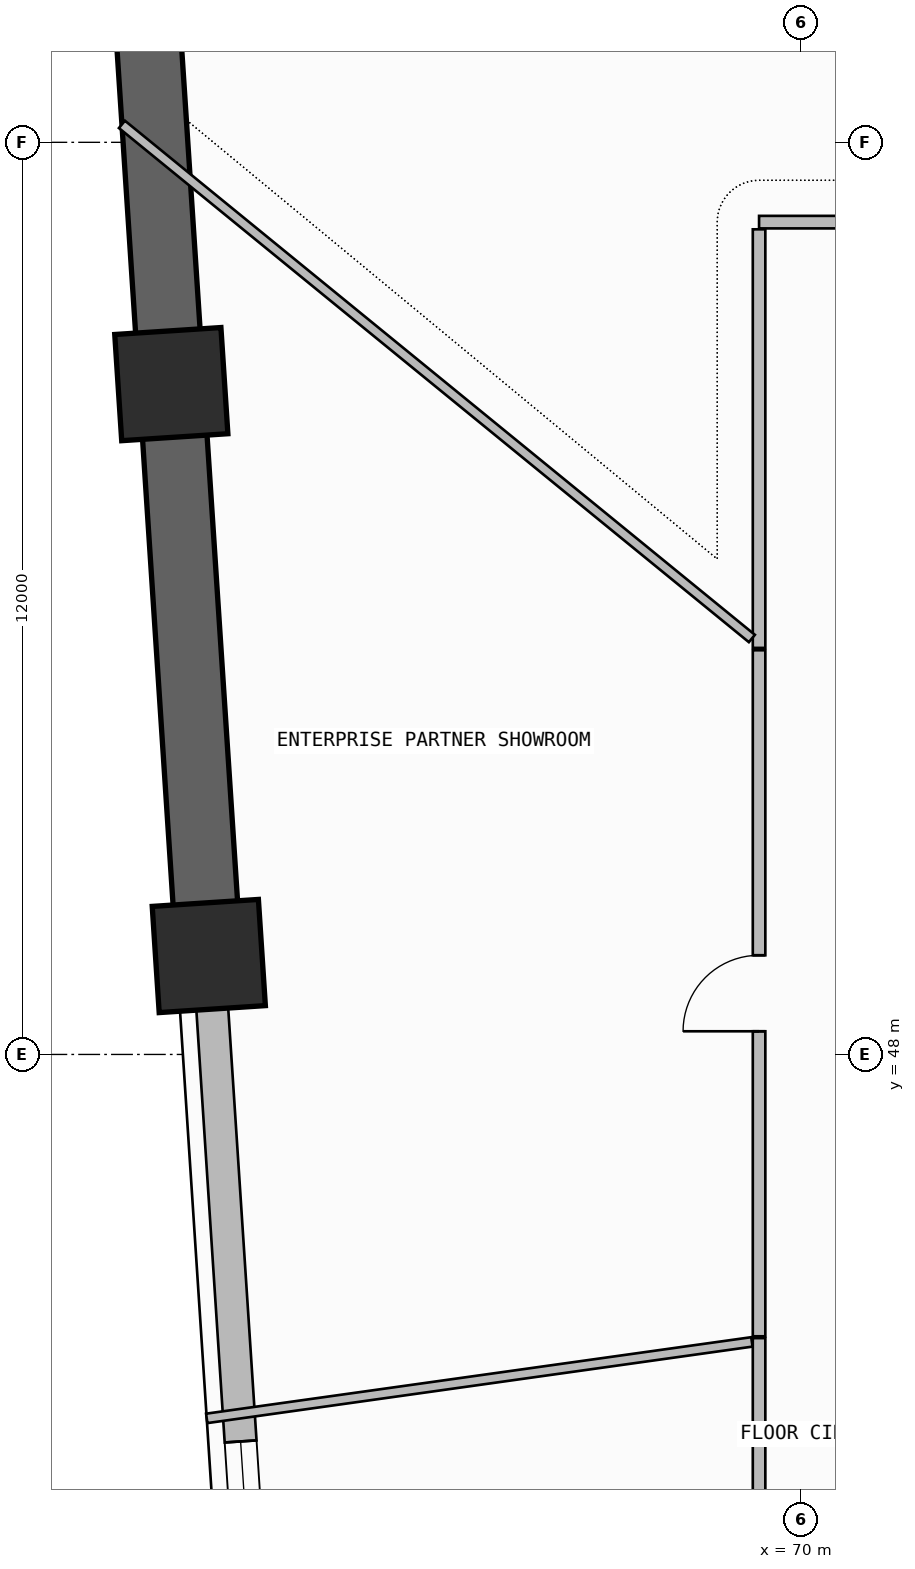
"""IFC4 building model, lengths in metres.
Left out: names, types, materials, properties, quantities, classifications, styles, units other than length and angle.
Written with IfcOpenShell. Run it as: python <this file> out.ifc"""

import sys

from ifc_helpers import new_model, si_unit, direction, frame, frame_2d, origin, origin_2d, place, context, subcontext, project, spatial, rectangle, extrude, element, fill, save


model = new_model("IFC4")
c1 = context("Model", 3, precision=1e-05, world=origin(), true_north=direction((0.0, 1.0)))
c2 = subcontext(c1, "Body", "Model", "MODEL_VIEW")
j1 = project(units=[si_unit("LENGTHUNIT", "METRE"), si_unit("PLANEANGLEUNIT", "RADIAN")], contexts=[c1])
p1 = place(None, origin())
s1 = spatial("IfcSite", under=j1, at=p1, CompositionType="ELEMENT")
p2 = place(p1, origin())
s2 = spatial("IfcBuilding", under=s1, at=p2, CompositionType="ELEMENT")
p3 = place(p2, frame((0.0, 0.0, 74.1)))
s3 = spatial("IfcBuildingStorey", under=s2, at=p3, CompositionType="ELEMENT", Elevation=74.1)
for number, where, z_axis, x_axis in (
    (1, (61.717, 56.819, 0.0), (0.0, 0.0, 1.0), (-0.065, 0.998, 0.0)),
    (2, (62.21, 49.295, 0.0), (0.0, 0.0, 1.0), (-0.065, 0.998, 0.0)),
):
    element("IfcColumn", number, at=place(p3, frame(where, z_axis=z_axis, x_axis=x_axis)), inside=s3, PredefinedType="COLUMN", context=c2, shape_type="SweptSolid", body=[
        extrude(rectangle(XDim=1.4, YDim=1.4, at=origin_2d()), origin(), (0.0, 0.0, 1.0), 3.6),
    ])
p4 = place(p3, frame((60.785, 71.031, -0.26), z_axis=(0.0, 0.0, 1.0), x_axis=(0.065409824833, -0.997858484363, 0.0)))
e3 = element("IfcWall", 3, at=p4, inside=s3, PredefinedType="SHEAR", context=c2, shape_type="SweptSolid", body=[
    extrude(rectangle(XDim=21.783, YDim=0.85, at=frame_2d((10.891, 0.0))), origin(), (0.0, 0.0, 1.0), 3.6),
])
p5 = place(p4, frame((2.2, 0.0, 1.2)))
e4 = element("IfcOpeningElement", 4, at=p5, cuts=e3, PredefinedType="OPENING", context=c2, shape_type="SweptSolid", body=[
    extrude(rectangle(XDim=1.8, YDim=0.9, at=frame_2d((0.9, 0.45))), frame((0.0, 0.435, 0.0), z_axis=(0.0, -1.0, 0.0), x_axis=(1.0, 0.0, 0.0)), (0.0, 0.0, 1.0), 0.87),
])
p6 = place(p3, frame((62.21, 49.295, 0.0), z_axis=(0.0, 0.0, 1.0), x_axis=(0.065396027757, -0.997859388668, 0.0)))
e5 = element("IfcWall", 5, at=p6, inside=s3, PredefinedType="SOLIDWALL", context=c2, shape_type="SweptSolid", body=[
    extrude(rectangle(XDim=14.242, YDim=0.42, at=frame_2d((7.121, 0.0))), origin(), (0.0, 0.0, 1.0), 2.325),
])
p7 = place(p6, frame((6.4, 0.0, 1.2)))
e6 = element("IfcOpeningElement", 6, at=p7, cuts=e5, PredefinedType="OPENING", context=c2, shape_type="SweptSolid", body=[
    extrude(rectangle(XDim=1.8, YDim=0.9, at=frame_2d((0.9, 0.45))), frame((0.0, 0.22, 0.0), z_axis=(0.0, -1.0, 0.0), x_axis=(1.0, 0.0, 0.0)), (0.0, 0.0, 1.0), 0.44),
])
p8 = place(p3, frame((69.45, 44.268, 0.0), z_axis=(0.0, 0.0, 1.0), x_axis=(0.0, -1.0, 0.0)))
e7 = element("IfcWall", 7, at=p8, inside=s3, PredefinedType="PARTITIONING", context=c2, shape_type="SweptSolid", body=[
    extrude(rectangle(XDim=11.306, YDim=0.165, at=frame_2d((5.653, 0.0))), origin(), (0.0, 0.0, 1.0), 3.34),
])
p9 = place(p8, frame((5.153, 0.0, 0.0)))
e8 = element("IfcOpeningElement", 8, at=p9, cuts=e7, PredefinedType="OPENING", context=c2, shape_type="SweptSolid", body=[
    extrude(rectangle(XDim=1.0, YDim=2.2, at=frame_2d((0.5, 1.1))), frame((0.0, 0.093, 0.0), z_axis=(0.0, -1.0, 0.0), x_axis=(1.0, 0.0, 0.0)), (0.0, 0.0, 1.0), 0.185),
])
p10 = place(p3, frame((62.183, 43.212, 0.0), z_axis=(0.0, 0.0, 1.0), x_axis=(0.990300324939, 0.138943392879, 0.0)))
e9 = element("IfcWall", 9, at=p10, inside=s3, PredefinedType="PARTITIONING", context=c2, shape_type="SweptSolid", body=[
    extrude(rectangle(XDim=7.243, YDim=0.125, at=frame_2d((3.622, 0.0))), origin(), (0.0, 0.0, 1.0), 3.34),
])
p11 = place(p3, frame((78.14, 58.95, 0.0), z_axis=(0.0, 0.0, 1.0), x_axis=(-1.0, 0.0, 0.0)))
e10 = element("IfcWall", 10, at=p11, inside=s3, PredefinedType="PARTITIONING", context=c2, shape_type="SweptSolid", body=[
    extrude(rectangle(XDim=8.69, YDim=0.165, at=frame_2d((4.345, 0.0))), origin(), (0.0, 0.0, 1.0), 2.725),
])
p12 = place(p11, frame((2.751, 0.0, 0.0)))
e11 = element("IfcOpeningElement", 11, at=p12, cuts=e10, PredefinedType="OPENING", context=c2, shape_type="SweptSolid", body=[
    extrude(rectangle(XDim=1.0, YDim=2.2, at=frame_2d((0.5, 1.1))), frame((0.0, 0.093, 0.0), z_axis=(0.0, -1.0, 0.0), x_axis=(1.0, 0.0, 0.0)), (0.0, 0.0, 1.0), 0.185),
])
p13 = place(p3, frame((69.45, 58.855, 0.0), z_axis=(0.0, 0.0, 1.0), x_axis=(0.0, -1.0, 0.0)))
e12 = element("IfcWall", 12, at=p13, inside=s3, PredefinedType="PARTITIONING", context=c2, shape_type="SweptSolid", body=[
    extrude(rectangle(XDim=5.507, YDim=0.165, at=frame_2d((2.753, 0.0))), origin(), (0.0, 0.0, 1.0), 2.725),
])
p14 = place(p3, frame((69.355, 53.472, 0.0), z_axis=(0.0, 0.0, 1.0), x_axis=(-0.774767054574, 0.632246796074, 0.0)))
e13 = element("IfcWall", 13, at=p14, inside=s3, PredefinedType="PARTITIONING", context=c2, shape_type="SweptSolid", body=[
    extrude(rectangle(XDim=10.698, YDim=0.125, at=frame_2d((5.349, 0.0))), origin(), (0.0, 0.0, 1.0), 2.325),
])
p15 = place(p3, frame((69.45, 53.317, 0.0), z_axis=(0.0, 0.0, 1.0), x_axis=(0.0, -1.0, 0.0)))
e14 = element("IfcWall", 14, at=p15, inside=s3, PredefinedType="PARTITIONING", context=c2, shape_type="SweptSolid", body=[
    extrude(rectangle(XDim=9.025, YDim=0.165, at=frame_2d((4.513, 0.0))), origin(), (0.0, 0.0, 1.0), 2.725),
])
p16 = place(p15, frame((4.013, 0.0, 0.0)))
e15 = element("IfcOpeningElement", 15, at=p16, cuts=e14, PredefinedType="OPENING", context=c2, shape_type="SweptSolid", body=[
    extrude(rectangle(XDim=1.0, YDim=2.2, at=frame_2d((0.5, 1.1))), frame((0.0, 0.093, 0.0), z_axis=(0.0, -1.0, 0.0), x_axis=(1.0, 0.0, 0.0)), (0.0, 0.0, 1.0), 0.185),
])
p17 = place(p7, origin())
e16 = element("IfcWindow", 16, at=p17, inside=s3, PartitioningType="SINGLE_PANEL", PredefinedType="WINDOW", context=c2, shape_type="SweptSolid", body=[
    extrude(rectangle(XDim=1.8, YDim=0.9, at=frame_2d((0.9, 0.45))), frame((0.0, 0.03, 0.0), z_axis=(0.0, -1.0, 0.0), x_axis=(1.0, 0.0, 0.0)), (0.0, 0.0, 1.0), 0.06),
])
fill(e6, e16)
p18 = place(p16, frame((1.0, 0.0, 0.0), z_axis=(0.0, 0.0, 1.0), x_axis=(-1.0, 0.0, 0.0)))
e17 = element("IfcDoor", 17, at=p18, inside=s3, OperationType="SINGLE_SWING_LEFT", PredefinedType="DOOR", context=c2, shape_type="SweptSolid", body=[
    extrude(rectangle(XDim=1.0, YDim=2.2, at=frame_2d((0.5, 1.1))), frame((0.0, 0.025, 0.0), z_axis=(0.0, -1.0, 0.0), x_axis=(1.0, 0.0, 0.0)), (0.0, 0.0, 1.0), 0.05),
])
fill(e15, e17)
save(model, sys.argv[1])
